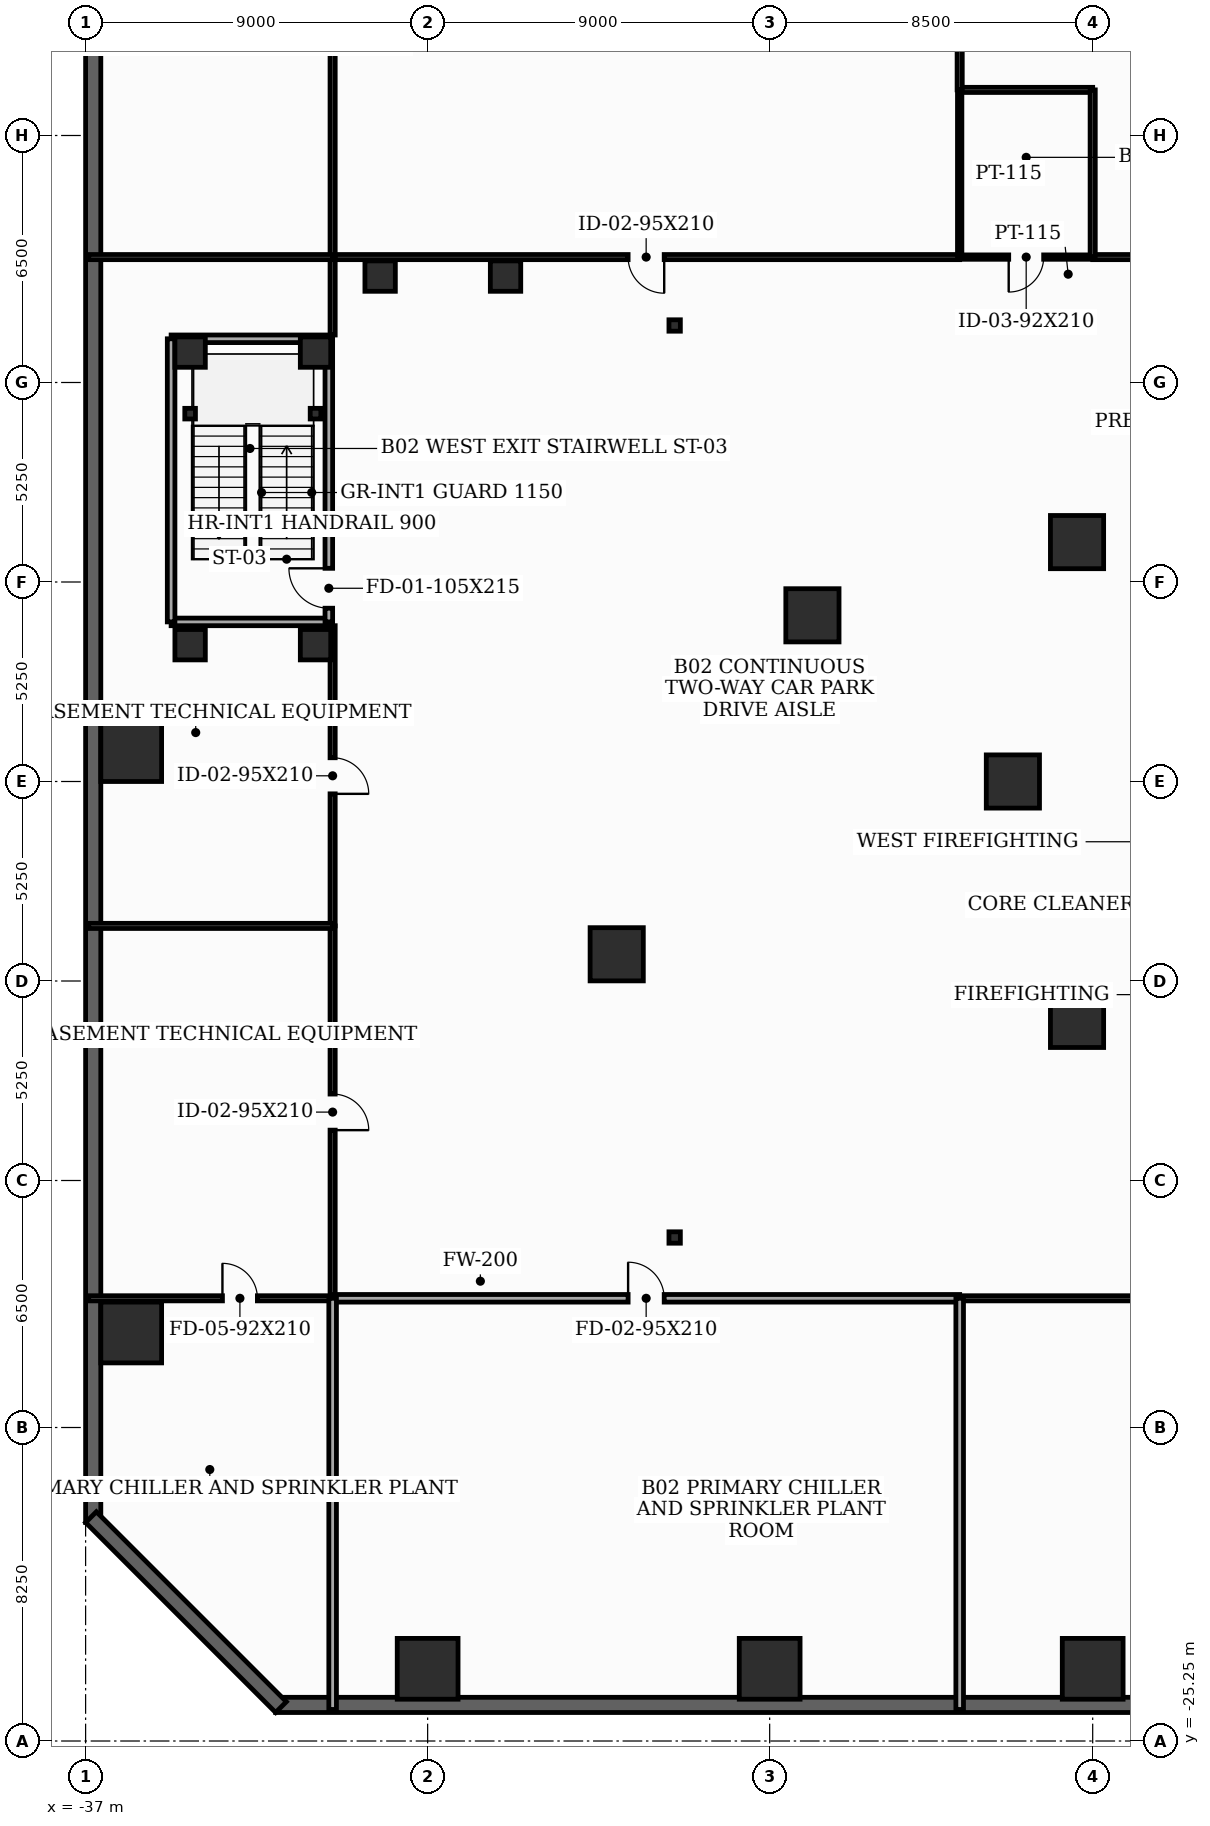
"""IFC4 building model, lengths in metres.
Left out: names, types, materials, properties, quantities, classifications, styles, units other than length and angle.
Written with IfcOpenShell. Run it as: python <this file> out.ifc"""

import sys

from ifc_helpers import new_model, si_unit, direction, frame, frame_2d, origin, origin_2d, place, context, subcontext, project, spatial, rectangle, i_section, extrude, element, fill, save


model = new_model("IFC4")
c1 = context("Model", 3, precision=1e-05, world=origin(), true_north=direction((0.0, 1.0)))
c2 = subcontext(c1, "Body", "Model", "MODEL_VIEW")
j1 = project(units=[si_unit("LENGTHUNIT", "METRE"), si_unit("PLANEANGLEUNIT", "RADIAN")], contexts=[c1])
p1 = place(None, origin())
s1 = spatial("IfcSite", under=j1, at=p1, CompositionType="ELEMENT")
p2 = place(p1, origin())
s2 = spatial("IfcBuilding", under=s1, at=p2, CompositionType="ELEMENT")
p3 = place(p2, frame((0.0, 0.0, -9.6)))
s3 = spatial("IfcBuildingStorey", under=s2, at=p3, CompositionType="ELEMENT", Elevation=-9.6)
for number, where, z_axis, x_axis in (
    (1, (-10.912, 6.3, 0.0), (0.0, 0.0, 1.0), (1.0, 0.0, 0.0)),
    (2, (-12.6, 0.0, 0.0), (0.0, 0.0, 1.0), (1.0, 0.0, 0.0)),
    (3, (-10.912, -6.3, 0.0), (0.0, 0.0, 1.0), (1.0, 0.0, 0.0)),
):
    element("IfcColumn", number, at=place(p3, frame(where, z_axis=z_axis, x_axis=x_axis)), inside=s3, PredefinedType="COLUMN", context=c2, shape_type="SweptSolid", body=[
        extrude(rectangle(XDim=1.4, YDim=1.4, at=origin_2d()), origin(), (0.0, 0.0, 1.0), 4.8),
    ])
for number, where, z_axis, x_axis in (
    (4, (-28.0, -23.35, 0.0), (0.0, 0.0, 1.0), (1.0, 0.0, 0.0)),
    (5, (-19.0, -23.35, 0.0), (0.0, 0.0, 1.0), (1.0, 0.0, 0.0)),
    (6, (-10.5, -23.35, 0.0), (0.0, 0.0, 1.0), (1.0, 0.0, 0.0)),
    (7, (-35.8, 0.8, 0.0), (0.0, 0.0, 1.0), (1.0, 0.0, 0.0)),
    (8, (-35.8, -14.5, 0.0), (0.0, 0.0, 1.0), (1.0, 0.0, 0.0)),
):
    element("IfcColumn", number, at=place(p3, frame(where, z_axis=z_axis, x_axis=x_axis)), inside=s3, PredefinedType="COLUMN", context=c2, shape_type="SweptSolid", body=[
        extrude(rectangle(XDim=1.6, YDim=1.6, at=origin_2d()), origin(), (0.0, 0.0, 1.0), 4.8),
    ])
for number, where, z_axis, x_axis in (
    (9, (-17.875, 4.373, 0.0), (0.0, 0.0, 1.0), (1.0, 0.0, 0.0)),
    (10, (-23.025, -4.547, 0.0), (0.0, 0.0, 1.0), (1.0, 0.0, 0.0)),
):
    element("IfcColumn", number, at=place(p3, frame(where, z_axis=z_axis, x_axis=x_axis)), inside=s3, PredefinedType="COLUMN", context=c2, shape_type="SweptSolid", body=[
        extrude(rectangle(XDim=1.4, YDim=1.4, at=origin_2d()), origin(), (0.0, 0.0, 1.0), 4.8),
    ])
for number, where, z_axis, x_axis in (
    (11, (-21.5, -12.0, 0.0), (0.0, 0.0, 1.0), (1.0, 0.0, 0.0)),
    (12, (-21.5, 12.0, 0.0), (0.0, 0.0, 1.0), (1.0, 0.0, 0.0)),
):
    element("IfcColumn", number, at=place(p3, frame(where, z_axis=z_axis, x_axis=x_axis)), inside=s3, PredefinedType="PILASTER", context=c2, shape_type="SweptSolid", body=[
        extrude(i_section(OverallWidth=0.3, OverallDepth=0.3, WebThickness=0.011, FlangeThickness=0.019, at=origin_2d()), origin(), (0.0, 0.0, 1.0), 4.8),
    ])
for number, where, z_axis, x_axis in (
    (13, (-34.25, 3.6, 0.0), (0.0, 0.0, 1.0), (1.0, 0.0, 0.0)),
    (14, (-30.95, 3.6, 0.0), (0.0, 0.0, 1.0), (1.0, 0.0, 0.0)),
    (15, (-30.95, 11.3, 0.0), (0.0, 0.0, 1.0), (1.0, 0.0, 0.0)),
    (16, (-34.25, 11.3, 0.0), (0.0, 0.0, 1.0), (1.0, 0.0, 0.0)),
):
    element("IfcColumn", number, at=place(p3, frame(where, z_axis=z_axis, x_axis=x_axis)), inside=s3, PredefinedType="COLUMN", context=c2, shape_type="SweptSolid", body=[
        extrude(rectangle(XDim=0.8, YDim=0.8, at=origin_2d()), origin(), (0.0, 0.0, 1.0), 4.8),
    ])
for number, where, z_axis, x_axis in (
    (17, (-34.25, 9.68, 0.0), (0.0, 0.0, 1.0), (1.0, 0.0, 0.0)),
    (18, (-30.95, 9.68, 0.0), (0.0, 0.0, 1.0), (1.0, 0.0, 0.0)),
):
    element("IfcColumn", number, at=place(p3, frame(where, z_axis=z_axis, x_axis=x_axis)), inside=s3, PredefinedType="PILASTER", context=c2, shape_type="SweptSolid", body=[
        extrude(i_section(OverallWidth=0.28, OverallDepth=0.28, WebThickness=0.01, FlangeThickness=0.018, at=origin_2d()), origin(), (0.0, 0.0, 1.0), 4.8),
    ])
for number, where, z_axis, x_axis in (
    (19, (-29.25, 13.3, 0.0), (0.0, 0.0, 1.0), (1.0, 0.0, 0.0)),
    (20, (-25.95, 13.3, 0.0), (0.0, 0.0, 1.0), (1.0, 0.0, 0.0)),
):
    element("IfcColumn", number, at=place(p3, frame(where, z_axis=z_axis, x_axis=x_axis)), inside=s3, PredefinedType="COLUMN", context=c2, shape_type="SweptSolid", body=[
        extrude(rectangle(XDim=0.8, YDim=0.8, at=origin_2d()), origin(), (0.0, 0.0, 1.0), 4.8),
    ])
p4 = place(p3, frame((-32.0, -24.3, 0.0), z_axis=(0.0, 0.0, 1.0), x_axis=(1.0, 0.0, 0.0)))
e21 = element("IfcWall", 21, at=p4, inside=s3, PredefinedType="USERDEFINED", context=c2, shape_type="SweptSolid", body=[
    extrude(rectangle(XDim=64.0, YDim=0.4, at=frame_2d((32.0, 0.0))), origin(), (0.0, 0.0, 1.0), 4.52),
])
p5 = place(p3, frame((-36.8, 28.5, 0.0), z_axis=(0.0, 0.0, 1.0), x_axis=(0.0, -1.0, 0.0)))
e22 = element("IfcWall", 22, at=p5, inside=s3, PredefinedType="USERDEFINED", context=c2, shape_type="SweptSolid", body=[
    extrude(rectangle(XDim=48.0, YDim=0.4, at=frame_2d((24.0, 0.0))), origin(), (0.0, 0.0, 1.0), 4.52),
])
p6 = place(p3, frame((-36.859, -19.359, 0.0), z_axis=(0.0, 0.0, 1.0), x_axis=(0.707106781187, -0.707106781187, 0.0)))
e23 = element("IfcWall", 23, at=p6, inside=s3, PredefinedType="USERDEFINED", context=c2, shape_type="SweptSolid", body=[
    extrude(rectangle(XDim=7.071, YDim=0.4, at=frame_2d((3.536, 0.0))), origin(), (0.0, 0.0, 1.0), 4.52),
])
p7 = place(p3, frame((-34.75, 4.2, 0.0), z_axis=(0.0, 0.0, 1.0), x_axis=(1.0, 0.0, 0.0)))
e24 = element("IfcWall", 24, at=p7, inside=s3, PredefinedType="SOLIDWALL", context=c2, shape_type="SweptSolid", body=[
    extrude(rectangle(XDim=4.15, YDim=0.2, at=frame_2d((2.075, 0.0))), origin(), (0.0, 0.0, 1.0), 3.905),
])
p8 = place(p3, frame((-30.6, 4.2, 0.0), z_axis=(0.0, 0.0, 1.0), x_axis=(0.0, 1.0, 0.0)))
e25 = element("IfcWall", 25, at=p8, inside=s3, PredefinedType="SOLIDWALL", context=c2, shape_type="SweptSolid", body=[
    extrude(rectangle(XDim=7.45, YDim=0.2, at=frame_2d((3.725, 0.0))), origin(), (0.0, 0.0, 1.0), 3.905),
])
p9 = place(p8, frame((0.36, 0.0, 0.0)))
e26 = element("IfcOpeningElement", 26, at=p9, cuts=e25, PredefinedType="OPENING", context=c2, shape_type="SweptSolid", body=[
    extrude(rectangle(XDim=1.05, YDim=2.15, at=frame_2d((0.525, 1.075))), frame((0.0, 0.11, 0.0), z_axis=(0.0, -1.0, 0.0), x_axis=(1.0, 0.0, 0.0)), (0.0, 0.0, 1.0), 0.22),
])
p10 = place(p3, frame((-30.6, 11.65, 0.0), z_axis=(0.0, 0.0, 1.0), x_axis=(-1.0, 0.0, 0.0)))
e27 = element("IfcWall", 27, at=p10, inside=s3, PredefinedType="SOLIDWALL", context=c2, shape_type="SweptSolid", body=[
    extrude(rectangle(XDim=4.15, YDim=0.2, at=frame_2d((2.075, 0.0))), origin(), (0.0, 0.0, 1.0), 4.52),
])
p11 = place(p3, frame((-34.75, 11.65, 0.0), z_axis=(0.0, 0.0, 1.0), x_axis=(0.0, -1.0, 0.0)))
e28 = element("IfcWall", 28, at=p11, inside=s3, PredefinedType="SOLIDWALL", context=c2, shape_type="SweptSolid", body=[
    extrude(rectangle(XDim=7.45, YDim=0.2, at=frame_2d((3.725, 0.0))), origin(), (0.0, 0.0, 1.0), 4.52),
])
p12 = place(p3, frame((-30.5, -3.8, 0.0), z_axis=(0.0, 0.0, 1.0), x_axis=(0.0, -1.0, 0.0)))
e29 = element("IfcWall", 29, at=p12, inside=s3, PredefinedType="PARTITIONING", context=c2, shape_type="SweptSolid", body=[
    extrude(rectangle(XDim=9.8, YDim=0.135, at=frame_2d((4.9, 0.0))), origin(), (0.0, 0.0, 1.0), 3.305),
])
p13 = place(p12, frame((4.425, 0.0, 0.0)))
e30 = element("IfcOpeningElement", 30, at=p13, cuts=e29, PredefinedType="OPENING", context=c2, shape_type="SweptSolid", body=[
    extrude(rectangle(XDim=0.95, YDim=2.1, at=frame_2d((0.475, 1.05))), frame((0.0, 0.077, 0.0), z_axis=(0.0, -1.0, 0.0), x_axis=(1.0, 0.0, 0.0)), (0.0, 0.0, 1.0), 0.155),
])
p14 = place(p3, frame((-30.5, -13.6, 0.0), z_axis=(0.0, 0.0, 1.0), x_axis=(1.0, 0.0, 0.0)))
e31 = element("IfcWall", 31, at=p14, inside=s3, PredefinedType="SOLIDWALL", context=c2, shape_type="SweptSolid", body=[
    extrude(rectangle(XDim=16.5, YDim=0.2, at=frame_2d((8.25, 0.0))), origin(), (0.0, 0.0, 1.0), 3.305),
])
p15 = place(p14, frame((7.775, 0.0, 0.0)))
e32 = element("IfcOpeningElement", 32, at=p15, cuts=e31, PredefinedType="OPENING", context=c2, shape_type="SweptSolid", body=[
    extrude(rectangle(XDim=0.95, YDim=2.1, at=frame_2d((0.475, 1.05))), frame((0.0, 0.11, 0.0), z_axis=(0.0, -1.0, 0.0), x_axis=(1.0, 0.0, 0.0)), (0.0, 0.0, 1.0), 0.22),
])
p16 = place(p3, frame((-14.0, -13.6, 0.0), z_axis=(0.0, 0.0, 1.0), x_axis=(1.0, 0.0, 0.0)))
e33 = element("IfcWall", 33, at=p16, inside=s3, PredefinedType="PARTITIONING", context=c2, shape_type="SweptSolid", body=[
    extrude(rectangle(XDim=28.0, YDim=0.135, at=frame_2d((14.0, 0.0))), origin(), (0.0, 0.0, 1.0), 3.305),
])
p17 = place(p16, frame((10.165, 0.0, 0.0)))
e34 = element("IfcOpeningElement", 34, at=p17, cuts=e33, PredefinedType="OPENING", context=c2, shape_type="SweptSolid", body=[
    extrude(rectangle(XDim=0.95, YDim=2.1, at=frame_2d((0.475, 1.05))), frame((0.0, 0.077, 0.0), z_axis=(0.0, -1.0, 0.0), x_axis=(1.0, 0.0, 0.0)), (0.0, 0.0, 1.0), 0.155),
])
p18 = place(p3, frame((14.0, 13.8, 0.0), z_axis=(0.0, 0.0, 1.0), x_axis=(-1.0, 0.0, 0.0)))
e35 = element("IfcWall", 35, at=p18, inside=s3, PredefinedType="PARTITIONING", context=c2, shape_type="SweptSolid", body=[
    extrude(rectangle(XDim=24.5, YDim=0.135, at=frame_2d((12.25, 0.0))), origin(), (0.0, 0.0, 1.0), 3.305),
])
p19 = place(p18, frame((8.835, 0.0, 0.0)))
e36 = element("IfcOpeningElement", 36, at=p19, cuts=e35, PredefinedType="OPENING", context=c2, shape_type="SweptSolid", body=[
    extrude(rectangle(XDim=0.95, YDim=2.1, at=frame_2d((0.475, 1.05))), frame((0.0, 0.077, 0.0), z_axis=(0.0, -1.0, 0.0), x_axis=(1.0, 0.0, 0.0)), (0.0, 0.0, 1.0), 0.155),
])
p20 = place(p3, frame((-10.5, 13.8, 0.0), z_axis=(0.0, 0.0, 1.0), x_axis=(-1.0, 0.0, 0.0)))
e37 = element("IfcWall", 37, at=p20, inside=s3, PredefinedType="PARTITIONING", context=c2, shape_type="SweptSolid", body=[
    extrude(rectangle(XDim=3.5, YDim=0.115, at=frame_2d((1.75, 0.0))), origin(), (0.0, 0.0, 1.0), 4.52),
])
p21 = place(p20, frame((1.29, 0.0, 0.0)))
e38 = element("IfcOpeningElement", 38, at=p21, cuts=e37, PredefinedType="OPENING", context=c2, shape_type="SweptSolid", body=[
    extrude(rectangle(XDim=0.92, YDim=2.1, at=frame_2d((0.46, 1.05))), frame((0.0, 0.067, 0.0), z_axis=(0.0, -1.0, 0.0), x_axis=(1.0, 0.0, 0.0)), (0.0, 0.0, 1.0), 0.135),
])
p22 = place(p3, frame((-14.0, 13.8, 0.0), z_axis=(0.0, 0.0, 1.0), x_axis=(-1.0, 0.0, 0.0)))
e39 = element("IfcWall", 39, at=p22, inside=s3, PredefinedType="PARTITIONING", context=c2, shape_type="SweptSolid", body=[
    extrude(rectangle(XDim=16.5, YDim=0.135, at=frame_2d((8.25, 0.0))), origin(), (0.0, 0.0, 1.0), 3.805),
])
p23 = place(p22, frame((7.775, 0.0, 0.0)))
e40 = element("IfcOpeningElement", 40, at=p23, cuts=e39, PredefinedType="OPENING", context=c2, shape_type="SweptSolid", body=[
    extrude(rectangle(XDim=0.95, YDim=2.1, at=frame_2d((0.475, 1.05))), frame((0.0, 0.077, 0.0), z_axis=(0.0, -1.0, 0.0), x_axis=(1.0, 0.0, 0.0)), (0.0, 0.0, 1.0), 0.155),
])
p24 = place(p3, frame((-30.5, 4.1, 0.0), z_axis=(0.0, 0.0, 1.0), x_axis=(0.0, -1.0, 0.0)))
e41 = element("IfcWall", 41, at=p24, inside=s3, PredefinedType="PARTITIONING", context=c2, shape_type="SweptSolid", body=[
    extrude(rectangle(XDim=7.9, YDim=0.135, at=frame_2d((3.95, 0.0))), origin(), (0.0, 0.0, 1.0), 3.305),
])
p25 = place(p24, frame((3.475, 0.0, 0.0)))
e42 = element("IfcOpeningElement", 42, at=p25, cuts=e41, PredefinedType="OPENING", context=c2, shape_type="SweptSolid", body=[
    extrude(rectangle(XDim=0.95, YDim=2.1, at=frame_2d((0.475, 1.05))), frame((0.0, 0.077, 0.0), z_axis=(0.0, -1.0, 0.0), x_axis=(1.0, 0.0, 0.0)), (0.0, 0.0, 1.0), 0.155),
])
p26 = place(p3, frame((-30.5, 13.8, 0.0), z_axis=(0.0, 0.0, 1.0), x_axis=(0.0, -1.0, 0.0)))
e43 = element("IfcWall", 43, at=p26, inside=s3, PredefinedType="PARTITIONING", context=c2, shape_type="SweptSolid", body=[
    extrude(rectangle(XDim=2.05, YDim=0.135, at=frame_2d((1.025, 0.0))), origin(), (0.0, 0.0, 1.0), 4.52),
])
p27 = place(p3, frame((-36.92, -13.6, 0.0), z_axis=(0.0, 0.0, 1.0), x_axis=(1.0, 0.0, 0.0)))
e44 = element("IfcWall", 44, at=p27, inside=s3, PredefinedType="PARTITIONING", context=c2, shape_type="SweptSolid", body=[
    extrude(rectangle(XDim=6.42, YDim=0.135, at=frame_2d((3.21, 0.0))), origin(), (0.0, 0.0, 1.0), 3.305),
])
p28 = place(p27, frame((3.521, 0.0, 0.0)))
e45 = element("IfcOpeningElement", 45, at=p28, cuts=e44, PredefinedType="OPENING", context=c2, shape_type="SweptSolid", body=[
    extrude(rectangle(XDim=0.92, YDim=2.1, at=frame_2d((0.46, 1.05))), frame((0.0, 0.077, 0.0), z_axis=(0.0, -1.0, 0.0), x_axis=(1.0, 0.0, 0.0)), (0.0, 0.0, 1.0), 0.155),
])
p29 = place(p3, frame((-30.5, -3.8, 0.0), z_axis=(0.0, 0.0, 1.0), x_axis=(-1.0, 0.0, 0.0)))
e46 = element("IfcWall", 46, at=p29, inside=s3, PredefinedType="PARTITIONING", context=c2, shape_type="SweptSolid", body=[
    extrude(rectangle(XDim=6.42, YDim=0.135, at=frame_2d((3.21, 0.0))), origin(), (0.0, 0.0, 1.0), 3.805),
])
p30 = place(p3, frame((-30.5, -24.42, 0.0), z_axis=(0.0, 0.0, 1.0), x_axis=(0.0, 1.0, 0.0)))
e47 = element("IfcWall", 47, at=p30, inside=s3, PredefinedType="SOLIDWALL", context=c2, shape_type="SweptSolid", body=[
    extrude(rectangle(XDim=10.82, YDim=0.2, at=frame_2d((5.41, 0.0))), origin(), (0.0, 0.0, 1.0), 3.805),
])
p31 = place(p3, frame((-14.0, -24.42, 0.0), z_axis=(0.0, 0.0, 1.0), x_axis=(0.0, 1.0, 0.0)))
e48 = element("IfcWall", 48, at=p31, inside=s3, PredefinedType="SOLIDWALL", context=c2, shape_type="SweptSolid", body=[
    extrude(rectangle(XDim=10.82, YDim=0.2, at=frame_2d((5.41, 0.0))), origin(), (0.0, 0.0, 1.0), 3.305),
])
p32 = place(p3, frame((-14.0, 18.2, 0.0), z_axis=(0.0, 0.0, 1.0), x_axis=(1.0, 0.0, 0.0)))
e49 = element("IfcWall", 49, at=p32, inside=s3, PredefinedType="PARTITIONING", context=c2, shape_type="SweptSolid", body=[
    extrude(rectangle(XDim=3.5, YDim=0.135, at=frame_2d((1.75, 0.0))), origin(), (0.0, 0.0, 1.0), 3.305),
])
p33 = place(p3, frame((-10.5, 18.2, 0.0), z_axis=(0.0, 0.0, 1.0), x_axis=(0.0, -1.0, 0.0)))
e50 = element("IfcWall", 50, at=p33, inside=s3, PredefinedType="PARTITIONING", context=c2, shape_type="SweptSolid", body=[
    extrude(rectangle(XDim=4.4, YDim=0.135, at=frame_2d((2.2, 0.0))), origin(), (0.0, 0.0, 1.0), 3.305),
])
p34 = place(p3, frame((-14.0, 24.1, 0.0), z_axis=(0.0, 0.0, 1.0), x_axis=(0.0, -1.0, 0.0)))
e51 = element("IfcWall", 51, at=p34, inside=s3, PredefinedType="PARTITIONING", context=c2, shape_type="SweptSolid", body=[
    extrude(rectangle(XDim=5.9, YDim=0.135, at=frame_2d((2.95, 0.0))), origin(), (0.0, 0.0, 1.0), 3.305),
])
p35 = place(p3, frame((-14.0, 18.2, 0.0), z_axis=(0.0, 0.0, 1.0), x_axis=(0.0, -1.0, 0.0)))
e52 = element("IfcWall", 52, at=p35, inside=s3, PredefinedType="PARTITIONING", context=c2, shape_type="SweptSolid", body=[
    extrude(rectangle(XDim=4.4, YDim=0.115, at=frame_2d((2.2, 0.0))), origin(), (0.0, 0.0, 1.0), 3.805),
])
p36 = place(p3, frame((-30.5, 33.42, 0.0), z_axis=(0.0, 0.0, 1.0), x_axis=(0.0, -1.0, 0.0)))
e53 = element("IfcWall", 53, at=p36, inside=s3, PredefinedType="PARTITIONING", context=c2, shape_type="SweptSolid", body=[
    extrude(rectangle(XDim=19.62, YDim=0.135, at=frame_2d((9.81, 0.0))), origin(), (0.0, 0.0, 1.0), 3.305),
])
p37 = place(p36, frame((9.35, 0.0, 0.0)))
e54 = element("IfcOpeningElement", 54, at=p37, cuts=e53, PredefinedType="OPENING", context=c2, shape_type="SweptSolid", body=[
    extrude(rectangle(XDim=0.92, YDim=2.1, at=frame_2d((0.46, 1.05))), frame((0.0, 0.077, 0.0), z_axis=(0.0, -1.0, 0.0), x_axis=(1.0, 0.0, 0.0)), (0.0, 0.0, 1.0), 0.155),
])
p38 = place(p3, frame((-36.92, 13.8, 0.0), z_axis=(0.0, 0.0, 1.0), x_axis=(1.0, 0.0, 0.0)))
e55 = element("IfcWall", 55, at=p38, inside=s3, PredefinedType="PARTITIONING", context=c2, shape_type="SweptSolid", body=[
    extrude(rectangle(XDim=6.42, YDim=0.135, at=frame_2d((3.21, 0.0))), origin(), (0.0, 0.0, 1.0), 3.805),
])
p39 = place(p9, origin())
e56 = element("IfcDoor", 56, at=p39, inside=s3, OperationType="SINGLE_SWING_RIGHT", PredefinedType="DOOR", context=c2, shape_type="SweptSolid", body=[
    extrude(rectangle(XDim=1.05, YDim=2.15, at=frame_2d((0.525, 1.075))), frame((0.0, 0.025, 0.0), z_axis=(0.0, -1.0, 0.0), x_axis=(1.0, 0.0, 0.0)), (0.0, 0.0, 1.0), 0.05),
])
fill(e26, e56)
p40 = place(p13, origin())
e57 = element("IfcDoor", 57, at=p40, inside=s3, OperationType="SINGLE_SWING_RIGHT", PredefinedType="DOOR", context=c2, shape_type="SweptSolid", body=[
    extrude(rectangle(XDim=0.95, YDim=2.1, at=frame_2d((0.475, 1.05))), frame((0.0, 0.025, 0.0), z_axis=(0.0, -1.0, 0.0), x_axis=(1.0, 0.0, 0.0)), (0.0, 0.0, 1.0), 0.05),
])
fill(e30, e57)
p41 = place(p15, origin())
e58 = element("IfcDoor", 58, at=p41, inside=s3, OperationType="SINGLE_SWING_LEFT", PredefinedType="DOOR", context=c2, shape_type="SweptSolid", body=[
    extrude(rectangle(XDim=0.95, YDim=2.1, at=frame_2d((0.475, 1.05))), frame((0.0, 0.025, 0.0), z_axis=(0.0, -1.0, 0.0), x_axis=(1.0, 0.0, 0.0)), (0.0, 0.0, 1.0), 0.05),
])
fill(e32, e58)
p42 = place(p21, origin())
e59 = element("IfcDoor", 59, at=p42, inside=s3, OperationType="SINGLE_SWING_RIGHT", PredefinedType="DOOR", context=c2, shape_type="SweptSolid", body=[
    extrude(rectangle(XDim=0.92, YDim=2.1, at=frame_2d((0.46, 1.05))), frame((0.0, 0.025, 0.0), z_axis=(0.0, -1.0, 0.0), x_axis=(1.0, 0.0, 0.0)), (0.0, 0.0, 1.0), 0.05),
])
fill(e38, e59)
p43 = place(p23, origin())
e60 = element("IfcDoor", 60, at=p43, inside=s3, OperationType="SINGLE_SWING_LEFT", PredefinedType="DOOR", context=c2, shape_type="SweptSolid", body=[
    extrude(rectangle(XDim=0.95, YDim=2.1, at=frame_2d((0.475, 1.05))), frame((0.0, 0.025, 0.0), z_axis=(0.0, -1.0, 0.0), x_axis=(1.0, 0.0, 0.0)), (0.0, 0.0, 1.0), 0.05),
])
fill(e40, e60)
p44 = place(p25, origin())
e61 = element("IfcDoor", 61, at=p44, inside=s3, OperationType="SINGLE_SWING_RIGHT", PredefinedType="DOOR", context=c2, shape_type="SweptSolid", body=[
    extrude(rectangle(XDim=0.95, YDim=2.1, at=frame_2d((0.475, 1.05))), frame((0.0, 0.025, 0.0), z_axis=(0.0, -1.0, 0.0), x_axis=(1.0, 0.0, 0.0)), (0.0, 0.0, 1.0), 0.05),
])
fill(e42, e61)
p45 = place(p28, origin())
e62 = element("IfcDoor", 62, at=p45, inside=s3, OperationType="SINGLE_SWING_LEFT", PredefinedType="DOOR", context=c2, shape_type="SweptSolid", body=[
    extrude(rectangle(XDim=0.92, YDim=2.1, at=frame_2d((0.46, 1.05))), frame((0.0, 0.025, 0.0), z_axis=(0.0, -1.0, 0.0), x_axis=(1.0, 0.0, 0.0)), (0.0, 0.0, 1.0), 0.05),
])
fill(e45, e62)
save(model, sys.argv[1])
